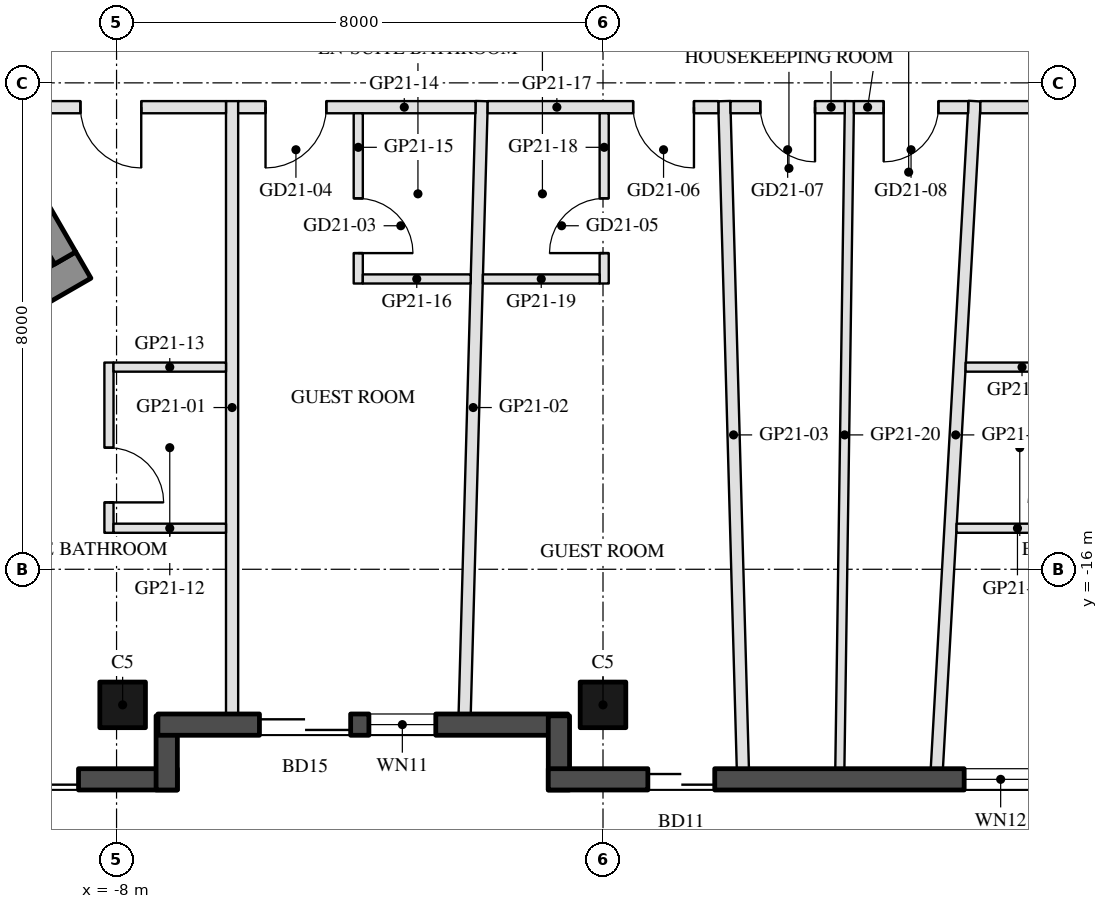
"""IFC4 building model, lengths in metres.
Left out: names, types, materials, properties, quantities, classifications, styles, units other than length and angle.
Written with IfcOpenShell. Run it as: python <this file> out.ifc"""

import sys

from ifc_helpers import new_model, si_unit, direction, frame, frame_2d, origin, origin_2d, place, context, subcontext, project, spatial, rectangle, hollow_rectangle, extrude, element, fill, save


model = new_model("IFC4")
c1 = context("Model", 3, precision=1e-05, world=origin(), true_north=direction((0.0, 1.0)))
c2 = subcontext(c1, "Body", "Model", "MODEL_VIEW")
j1 = project(units=[si_unit("LENGTHUNIT", "METRE"), si_unit("PLANEANGLEUNIT", "RADIAN")], contexts=[c1])
p1 = place(None, origin())
s1 = spatial("IfcSite", under=j1, at=p1, CompositionType="ELEMENT")
p2 = place(p1, origin())
s2 = spatial("IfcBuilding", under=s1, at=p2, CompositionType="ELEMENT")
p3 = place(p2, frame((0.0, 0.0, 220.6)))
s3 = spatial("IfcBuildingStorey", under=s2, at=p3, CompositionType="ELEMENT", Elevation=220.6)
for number, where, z_axis, x_axis in (
    (1, (-7.9, -18.23, 0.0), (0.0, 0.0, 1.0), (-1.0, 0.0, 0.0)),
    (2, (0.0, -18.23, 0.0), (0.0, 0.0, 1.0), (-1.0, 0.0, 0.0)),
):
    element("IfcColumn", number, at=place(p3, frame(where, z_axis=z_axis, x_axis=x_axis)), inside=s3, PredefinedType="COLUMN", context=c2, shape_type="SweptSolid", body=[
        extrude(hollow_rectangle(XDim=0.75, YDim=0.75, WallThickness=0.035, at=origin_2d()), origin(), (0.0, 0.0, 1.0), 3.7),
    ])
p4 = place(p3, frame((-18.816, -19.455, 0.0), z_axis=(0.0, 0.0, 1.0), x_axis=(1.0, 0.0, 0.0)))
e3 = element("IfcWall", 3, at=p4, inside=s3, PredefinedType="SOLIDWALL", context=c2, shape_type="SweptSolid", body=[
    extrude(rectangle(XDim=11.816, YDim=0.35, at=frame_2d((5.908, 0.0))), origin(), (0.0, 0.0, 1.0), 3.55),
])
p5 = place(p4, frame((0.381, 0.0, 0.3)))
e4 = element("IfcOpeningElement", 4, at=p5, cuts=e3, PredefinedType="OPENING", context=c2, shape_type="SweptSolid", body=[
    extrude(rectangle(XDim=1.9, YDim=2.65, at=frame_2d((0.95, 1.325))), frame((0.0, 0.185, 0.0), z_axis=(0.0, -1.0, 0.0), x_axis=(1.0, 0.0, 0.0)), (0.0, 0.0, 1.0), 0.37),
])
p6 = place(p4, frame((7.79, 0.0, 0.0)))
e5 = element("IfcOpeningElement", 5, at=p6, cuts=e3, PredefinedType="OPENING", context=c2, shape_type="SweptSolid", body=[
    extrude(rectangle(XDim=2.4, YDim=2.4, at=frame_2d((1.2, 1.2))), frame((0.0, 0.185, 0.0), z_axis=(0.0, -1.0, 0.0), x_axis=(1.0, 0.0, 0.0)), (0.0, 0.0, 1.0), 0.37),
])
p7 = place(p4, frame((3.741, 0.0, 0.3)))
e6 = element("IfcOpeningElement", 6, at=p7, cuts=e3, PredefinedType="OPENING", context=c2, shape_type="SweptSolid", body=[
    extrude(rectangle(XDim=1.7, YDim=2.65, at=frame_2d((0.85, 1.325))), frame((0.0, 0.185, 0.0), z_axis=(0.0, -1.0, 0.0), x_axis=(1.0, 0.0, 0.0)), (0.0, 0.0, 1.0), 0.37),
])
p8 = place(p4, frame((5.741, 0.0, 0.3)))
e7 = element("IfcOpeningElement", 7, at=p8, cuts=e3, PredefinedType="OPENING", context=c2, shape_type="SweptSolid", body=[
    extrude(rectangle(XDim=1.7, YDim=2.65, at=frame_2d((0.85, 1.325))), frame((0.0, 0.185, 0.0), z_axis=(0.0, -1.0, 0.0), x_axis=(1.0, 0.0, 0.0)), (0.0, 0.0, 1.0), 0.37),
])
p9 = place(p3, frame((-7.175, -19.63, 0.0), z_axis=(0.0, 0.0, 1.0), x_axis=(0.0, 1.0, 0.0)))
e8 = element("IfcWall", 8, at=p9, inside=s3, PredefinedType="SOLIDWALL", context=c2, shape_type="SweptSolid", body=[
    extrude(rectangle(XDim=1.22, YDim=0.35, at=frame_2d((0.61, 0.0))), origin(), (0.0, 0.0, 1.0), 3.55),
])
p10 = place(p3, frame((-7.32, -18.555, 0.0), z_axis=(0.0, 0.0, 1.0), x_axis=(1.0, 0.0, 0.0)))
e9 = element("IfcWall", 9, at=p10, inside=s3, PredefinedType="SOLIDWALL", context=c2, shape_type="SweptSolid", body=[
    extrude(rectangle(XDim=6.74, YDim=0.35, at=frame_2d((3.37, 0.0))), origin(), (0.0, 0.0, 1.0), 3.55),
])
p11 = place(p10, frame((1.67, 0.0, 0.0)))
e10 = element("IfcOpeningElement", 10, at=p11, cuts=e9, PredefinedType="OPENING", context=c2, shape_type="SweptSolid", body=[
    extrude(rectangle(XDim=1.5, YDim=2.4, at=frame_2d((0.75, 1.2))), frame((0.0, 0.185, 0.0), z_axis=(0.0, -1.0, 0.0), x_axis=(1.0, 0.0, 0.0)), (0.0, 0.0, 1.0), 0.37),
])
p12 = place(p10, frame((3.47, 0.0, 0.3)))
e11 = element("IfcOpeningElement", 11, at=p12, cuts=e9, PredefinedType="OPENING", context=c2, shape_type="SweptSolid", body=[
    extrude(rectangle(XDim=1.1, YDim=2.65, at=frame_2d((0.55, 1.325))), frame((0.0, 0.185, 0.0), z_axis=(0.0, -1.0, 0.0), x_axis=(1.0, 0.0, 0.0)), (0.0, 0.0, 1.0), 0.37),
])
p13 = place(p3, frame((-0.725, -18.41, 0.0), z_axis=(0.0, 0.0, 1.0), x_axis=(0.0, -1.0, 0.0)))
e12 = element("IfcWall", 12, at=p13, inside=s3, PredefinedType="SOLIDWALL", context=c2, shape_type="SweptSolid", body=[
    extrude(rectangle(XDim=1.22, YDim=0.35, at=frame_2d((0.61, 0.0))), origin(), (0.0, 0.0, 1.0), 3.55),
])
p14 = place(p3, frame((-0.9, -19.455, 0.0), z_axis=(0.0, 0.0, 1.0), x_axis=(1.0, 0.0, 0.0)))
e13 = element("IfcWall", 13, at=p14, inside=s3, PredefinedType="SOLIDWALL", context=c2, shape_type="SweptSolid", body=[
    extrude(rectangle(XDim=9.7, YDim=0.35, at=frame_2d((4.85, 0.0))), origin(), (0.0, 0.0, 1.0), 3.55),
])
p15 = place(p14, frame((1.638, 0.0, 0.0)))
e14 = element("IfcOpeningElement", 14, at=p15, cuts=e13, PredefinedType="OPENING", context=c2, shape_type="SweptSolid", body=[
    extrude(rectangle(XDim=1.1, YDim=2.4, at=frame_2d((0.55, 1.2))), frame((0.0, 0.185, 0.0), z_axis=(0.0, -1.0, 0.0), x_axis=(1.0, 0.0, 0.0)), (0.0, 0.0, 1.0), 0.37),
])
p16 = place(p14, frame((6.84, 0.0, 0.3)))
e15 = element("IfcOpeningElement", 15, at=p16, cuts=e13, PredefinedType="OPENING", context=c2, shape_type="SweptSolid", body=[
    extrude(rectangle(XDim=1.2, YDim=2.65, at=frame_2d((0.6, 1.325))), frame((0.0, 0.185, 0.0), z_axis=(0.0, -1.0, 0.0), x_axis=(1.0, 0.0, 0.0)), (0.0, 0.0, 1.0), 0.37),
])
p17 = place(p3, frame((-8.547, -10.997, 0.0), z_axis=(0.0, 0.0, 1.0), x_axis=(-0.866025009528, -0.500000682871, 0.0)))
e16 = element("IfcWall", 16, at=p17, inside=s3, PredefinedType="SHEAR", context=c2, shape_type="SweptSolid", body=[
    extrude(rectangle(XDim=14.837, YDim=0.5, at=frame_2d((7.418, 0.0))), origin(), (0.0, 0.0, 1.0), 3.5),
])
p18 = place(p3, frame((-13.845, -2.22, 0.0), z_axis=(0.0, 0.0, 1.0), x_axis=(0.500004234368, -0.866022959057, 0.0)))
e17 = element("IfcWall", 17, at=p18, inside=s3, PredefinedType="SHEAR", context=c2, shape_type="SweptSolid", body=[
    extrude(rectangle(XDim=10.0, YDim=0.4, at=frame_2d((5.0, 0.0))), origin(), (0.0, 0.0, 1.0), 3.5),
])
p19 = place(p18, frame((3.55, 0.0, 0.0)))
e18 = element("IfcOpeningElement", 18, at=p19, cuts=e17, PredefinedType="OPENING", context=c2, shape_type="SweptSolid", body=[
    extrude(rectangle(XDim=1.1, YDim=2.1, at=frame_2d((0.55, 1.05))), frame((0.0, 0.21, 0.0), z_axis=(0.0, -1.0, 0.0), x_axis=(1.0, 0.0, 0.0)), (0.0, 0.0, 1.0), 0.42),
])
p20 = place(p18, frame((5.85, 0.0, 0.0)))
e19 = element("IfcOpeningElement", 19, at=p20, cuts=e17, PredefinedType="OPENING", context=c2, shape_type="SweptSolid", body=[
    extrude(rectangle(XDim=1.4, YDim=2.1, at=frame_2d((0.7, 1.05))), frame((0.0, 0.21, 0.0), z_axis=(0.0, -1.0, 0.0), x_axis=(1.0, 0.0, 0.0)), (0.0, 0.0, 1.0), 0.42),
])
p21 = place(p3, frame((-6.1, -18.38, 0.0), z_axis=(0.0, 0.0, 1.0), x_axis=(0.0, 1.0, 0.0)))
e20 = element("IfcWall", 20, at=p21, inside=s3, PredefinedType="PARTITIONING", context=c2, shape_type="SweptSolid", body=[
    extrude(rectangle(XDim=10.08, YDim=0.2, at=frame_2d((5.04, 0.0))), origin(), (0.0, 0.0, 1.0), 3.06),
])
p22 = place(p3, frame((-2.275, -18.38, 0.0), z_axis=(0.0, 0.0, 1.0), x_axis=(0.027818812611, 0.999612981941, 0.0)))
e21 = element("IfcWall", 21, at=p22, inside=s3, PredefinedType="PARTITIONING", context=c2, shape_type="SweptSolid", body=[
    extrude(rectangle(XDim=10.084, YDim=0.2, at=frame_2d((5.042, 0.0))), origin(), (0.0, 0.0, 1.0), 3.06),
])
p23 = place(p3, frame((2.3, -19.28, 0.0), z_axis=(0.0, 0.0, 1.0), x_axis=(-0.027827525898, 0.999612739416, 0.0)))
e22 = element("IfcWall", 22, at=p23, inside=s3, PredefinedType="PARTITIONING", context=c2, shape_type="SweptSolid", body=[
    extrude(rectangle(XDim=10.984, YDim=0.2, at=frame_2d((5.492, 0.0))), origin(), (0.0, 0.0, 1.0), 3.06),
])
p24 = place(p3, frame((5.49, -19.28, 0.0), z_axis=(0.0, 0.0, 1.0), x_axis=(0.056497863711, 0.998402720046, 0.0)))
e23 = element("IfcWall", 23, at=p24, inside=s3, PredefinedType="PARTITIONING", context=c2, shape_type="SweptSolid", body=[
    extrude(rectangle(XDim=10.998, YDim=0.2, at=frame_2d((5.499, 0.0))), origin(), (0.0, 0.0, 1.0), 3.06),
])
p25 = place(p3, frame((-6.2, -8.4, 0.0), z_axis=(0.0, 0.0, 1.0), x_axis=(-1.0, 0.0, 0.0)))
e24 = element("IfcWall", 24, at=p25, inside=s3, PredefinedType="PARTITIONING", context=c2, shape_type="SweptSolid", body=[
    extrude(rectangle(XDim=3.788, YDim=0.2, at=frame_2d((1.894, 0.0))), origin(), (0.0, 0.0, 1.0), 2.95),
])
p26 = place(p25, frame((1.394, 0.0, 0.0)))
e25 = element("IfcOpeningElement", 25, at=p26, cuts=e24, PredefinedType="OPENING", context=c2, shape_type="SweptSolid", body=[
    extrude(rectangle(XDim=1.0, YDim=2.1, at=frame_2d((0.5, 1.05))), frame((0.0, 0.11, 0.0), z_axis=(0.0, -1.0, 0.0), x_axis=(1.0, 0.0, 0.0)), (0.0, 0.0, 1.0), 0.22),
])
p27 = place(p3, frame((-8.125, -12.6, 0.0), z_axis=(0.0, 0.0, 1.0), x_axis=(0.0, -1.0, 0.0)))
e26 = element("IfcWall", 26, at=p27, inside=s3, PredefinedType="PARTITIONING", context=c2, shape_type="SweptSolid", body=[
    extrude(rectangle(XDim=2.8, YDim=0.15, at=frame_2d((1.4, 0.0))), origin(), (0.0, 0.0, 1.0), 3.55),
])
p28 = place(p27, frame((1.4, 0.0, 0.0)))
e27 = element("IfcOpeningElement", 27, at=p28, cuts=e26, PredefinedType="OPENING", context=c2, shape_type="SweptSolid", body=[
    extrude(rectangle(XDim=0.9, YDim=2.1, at=frame_2d((0.45, 1.05))), frame((0.0, 0.085, 0.0), z_axis=(0.0, -1.0, 0.0), x_axis=(1.0, 0.0, 0.0)), (0.0, 0.0, 1.0), 0.17),
])
for number, where, z_axis, x_axis in (
    (28, (-8.05, -15.325, 0.0), (0.0, 0.0, 1.0), (1.0, 0.0, 0.0)),
    (29, (-8.05, -12.675, 0.0), (0.0, 0.0, 1.0), (1.0, 0.0, 0.0)),
):
    element("IfcWall", number, at=place(p3, frame(where, z_axis=z_axis, x_axis=x_axis)), inside=s3, PredefinedType="PARTITIONING", context=c2, shape_type="SweptSolid", body=[
        extrude(rectangle(XDim=1.85, YDim=0.15, at=frame_2d((0.925, 0.0))), origin(), (0.0, 0.0, 1.0), 2.95),
    ])
p29 = place(p3, frame((-2.097, -8.4, 0.0), z_axis=(0.0, 0.0, 1.0), x_axis=(-1.0, 0.0, 0.0)))
e30 = element("IfcWall", 30, at=p29, inside=s3, PredefinedType="PARTITIONING", context=c2, shape_type="SweptSolid", body=[
    extrude(rectangle(XDim=3.903, YDim=0.2, at=frame_2d((1.951, 0.0))), origin(), (0.0, 0.0, 1.0), 2.95),
])
p30 = place(p29, frame((2.453, 0.0, 0.0)))
e31 = element("IfcOpeningElement", 31, at=p30, cuts=e30, PredefinedType="OPENING", context=c2, shape_type="SweptSolid", body=[
    extrude(rectangle(XDim=1.0, YDim=2.1, at=frame_2d((0.5, 1.05))), frame((0.0, 0.11, 0.0), z_axis=(0.0, -1.0, 0.0), x_axis=(1.0, 0.0, 0.0)), (0.0, 0.0, 1.0), 0.22),
])
p31 = place(p3, frame((-4.025, -8.5, 0.0), z_axis=(0.0, 0.0, 1.0), x_axis=(0.0, -1.0, 0.0)))
e32 = element("IfcWall", 32, at=p31, inside=s3, PredefinedType="PARTITIONING", context=c2, shape_type="SweptSolid", body=[
    extrude(rectangle(XDim=2.8, YDim=0.15, at=frame_2d((1.4, 0.0))), origin(), (0.0, 0.0, 1.0), 2.95),
])
p32 = place(p31, frame((1.4, 0.0, 0.0)))
e33 = element("IfcOpeningElement", 33, at=p32, cuts=e32, PredefinedType="OPENING", context=c2, shape_type="SweptSolid", body=[
    extrude(rectangle(XDim=0.9, YDim=2.1, at=frame_2d((0.45, 1.05))), frame((0.0, 0.085, 0.0), z_axis=(0.0, -1.0, 0.0), x_axis=(1.0, 0.0, 0.0)), (0.0, 0.0, 1.0), 0.17),
])
p33 = place(p3, frame((-3.95, -11.225, 0.0), z_axis=(0.0, 0.0, 1.0), x_axis=(1.0, 0.0, 0.0)))
e34 = element("IfcWall", 34, at=p33, inside=s3, PredefinedType="PARTITIONING", context=c2, shape_type="SweptSolid", body=[
    extrude(rectangle(XDim=1.774, YDim=0.15, at=frame_2d((0.887, 0.0))), origin(), (0.0, 0.0, 1.0), 2.95),
])
p34 = place(p3, frame((1.897, -8.4, 0.0), z_axis=(0.0, 0.0, 1.0), x_axis=(-1.0, 0.0, 0.0)))
e35 = element("IfcWall", 35, at=p34, inside=s3, PredefinedType="PARTITIONING", context=c2, shape_type="SweptSolid", body=[
    extrude(rectangle(XDim=3.794, YDim=0.2, at=frame_2d((1.897, 0.0))), origin(), (0.0, 0.0, 1.0), 2.95),
])
p35 = place(p34, frame((0.401, 0.0, 0.0)))
e36 = element("IfcOpeningElement", 36, at=p35, cuts=e35, PredefinedType="OPENING", context=c2, shape_type="SweptSolid", body=[
    extrude(rectangle(XDim=1.0, YDim=2.1, at=frame_2d((0.5, 1.05))), frame((0.0, 0.11, 0.0), z_axis=(0.0, -1.0, 0.0), x_axis=(1.0, 0.0, 0.0)), (0.0, 0.0, 1.0), 0.22),
])
p36 = place(p3, frame((0.019, -11.3, 0.0), z_axis=(0.0, 0.0, 1.0), x_axis=(0.0, 1.0, 0.0)))
e37 = element("IfcWall", 37, at=p36, inside=s3, PredefinedType="PARTITIONING", context=c2, shape_type="SweptSolid", body=[
    extrude(rectangle(XDim=2.8, YDim=0.15, at=frame_2d((1.4, 0.0))), origin(), (0.0, 0.0, 1.0), 2.95),
])
p37 = place(p36, frame((0.5, 0.0, 0.0)))
e38 = element("IfcOpeningElement", 38, at=p37, cuts=e37, PredefinedType="OPENING", context=c2, shape_type="SweptSolid", body=[
    extrude(rectangle(XDim=0.9, YDim=2.1, at=frame_2d((0.45, 1.05))), frame((0.0, 0.085, 0.0), z_axis=(0.0, -1.0, 0.0), x_axis=(1.0, 0.0, 0.0)), (0.0, 0.0, 1.0), 0.17),
])
p38 = place(p3, frame((-1.976, -11.225, 0.0), z_axis=(0.0, 0.0, 1.0), x_axis=(1.0, 0.0, 0.0)))
e39 = element("IfcWall", 39, at=p38, inside=s3, PredefinedType="PARTITIONING", context=c2, shape_type="SweptSolid", body=[
    extrude(rectangle(XDim=1.92, YDim=0.15, at=frame_2d((0.96, 0.0))), origin(), (0.0, 0.0, 1.0), 2.95),
])
p39 = place(p3, frame((3.895, -19.28, 0.0), z_axis=(0.0, 0.0, 1.0), x_axis=(0.014384601302, 0.99989653627, 0.0)))
e40 = element("IfcWall", 40, at=p39, inside=s3, PredefinedType="PARTITIONING", context=c2, shape_type="SweptSolid", body=[
    extrude(rectangle(XDim=10.981, YDim=0.15, at=frame_2d((5.491, 0.0))), origin(), (0.0, 0.0, 1.0), 2.95),
])
p40 = place(p3, frame((3.976, -8.4, 0.0), z_axis=(0.0, 0.0, 1.0), x_axis=(-1.0, 0.0, 0.0)))
e41 = element("IfcWall", 41, at=p40, inside=s3, PredefinedType="PARTITIONING", context=c2, shape_type="SweptSolid", body=[
    extrude(rectangle(XDim=1.879, YDim=0.2, at=frame_2d((0.939, 0.0))), origin(), (0.0, 0.0, 1.0), 2.95),
])
p41 = place(p40, frame((0.49, 0.0, 0.0)))
e42 = element("IfcOpeningElement", 42, at=p41, cuts=e41, PredefinedType="OPENING", context=c2, shape_type="SweptSolid", body=[
    extrude(rectangle(XDim=0.9, YDim=2.1, at=frame_2d((0.45, 1.05))), frame((0.0, 0.11, 0.0), z_axis=(0.0, -1.0, 0.0), x_axis=(1.0, 0.0, 0.0)), (0.0, 0.0, 1.0), 0.22),
])
p42 = place(p3, frame((6.006, -8.4, 0.0), z_axis=(0.0, 0.0, 1.0), x_axis=(-1.0, 0.0, 0.0)))
e43 = element("IfcWall", 43, at=p42, inside=s3, PredefinedType="PARTITIONING", context=c2, shape_type="SweptSolid", body=[
    extrude(rectangle(XDim=1.879, YDim=0.2, at=frame_2d((0.939, 0.0))), origin(), (0.0, 0.0, 1.0), 3.55),
])
p43 = place(p42, frame((0.49, 0.0, 0.0)))
e44 = element("IfcOpeningElement", 44, at=p43, cuts=e43, PredefinedType="OPENING", context=c2, shape_type="SweptSolid", body=[
    extrude(rectangle(XDim=0.9, YDim=2.1, at=frame_2d((0.45, 1.05))), frame((0.0, 0.11, 0.0), z_axis=(0.0, -1.0, 0.0), x_axis=(1.0, 0.0, 0.0)), (0.0, 0.0, 1.0), 0.22),
])
p44 = place(p3, frame((9.988, -8.4, 0.0), z_axis=(0.0, 0.0, 1.0), x_axis=(-1.0, 0.0, 0.0)))
e45 = element("IfcWall", 45, at=p44, inside=s3, PredefinedType="PARTITIONING", context=c2, shape_type="SweptSolid", body=[
    extrude(rectangle(XDim=3.782, YDim=0.2, at=frame_2d((1.891, 0.0))), origin(), (0.0, 0.0, 1.0), 2.95),
])
p45 = place(p44, frame((1.391, 0.0, 0.0)))
e46 = element("IfcOpeningElement", 46, at=p45, cuts=e45, PredefinedType="OPENING", context=c2, shape_type="SweptSolid", body=[
    extrude(rectangle(XDim=1.0, YDim=2.1, at=frame_2d((0.5, 1.05))), frame((0.0, 0.11, 0.0), z_axis=(0.0, -1.0, 0.0), x_axis=(1.0, 0.0, 0.0)), (0.0, 0.0, 1.0), 0.22),
])
p46 = place(p3, frame((5.814, -15.325, 0.0), z_axis=(0.0, 0.0, 1.0), x_axis=(1.0, 0.0, 0.0)))
e47 = element("IfcWall", 47, at=p46, inside=s3, PredefinedType="PARTITIONING", context=c2, shape_type="SweptSolid", body=[
    extrude(rectangle(XDim=2.004, YDim=0.15, at=frame_2d((1.002, 0.0))), origin(), (0.0, 0.0, 1.0), 2.95),
])
p47 = place(p3, frame((5.964, -12.675, 0.0), z_axis=(0.0, 0.0, 1.0), x_axis=(1.0, 0.0, 0.0)))
e48 = element("IfcWall", 48, at=p47, inside=s3, PredefinedType="PARTITIONING", context=c2, shape_type="SweptSolid", body=[
    extrude(rectangle(XDim=1.854, YDim=0.15, at=frame_2d((0.927, 0.0))), origin(), (0.0, 0.0, 1.0), 2.95),
])
p48 = place(p6, frame((2.4, 0.0, 0.0), z_axis=(0.0, 0.0, 1.0), x_axis=(-1.0, 0.0, 0.0)))
e49 = element("IfcDoor", 49, at=p48, inside=s3, OperationType="SLIDING_TO_LEFT", PredefinedType="DOOR", context=c2, shape_type="SweptSolid", body=[
    extrude(rectangle(XDim=2.4, YDim=2.4, at=frame_2d((1.2, 1.2))), frame((0.0, 0.025, 0.0), z_axis=(0.0, -1.0, 0.0), x_axis=(1.0, 0.0, 0.0)), (0.0, 0.0, 1.0), 0.05),
])
fill(e5, e49)
p49 = place(p11, frame((1.5, 0.0, 0.0), z_axis=(0.0, 0.0, 1.0), x_axis=(-1.0, 0.0, 0.0)))
e50 = element("IfcDoor", 50, at=p49, inside=s3, OperationType="SLIDING_TO_LEFT", PredefinedType="DOOR", context=c2, shape_type="SweptSolid", body=[
    extrude(rectangle(XDim=1.5, YDim=2.4, at=frame_2d((0.75, 1.2))), frame((0.0, 0.025, 0.0), z_axis=(0.0, -1.0, 0.0), x_axis=(1.0, 0.0, 0.0)), (0.0, 0.0, 1.0), 0.05),
])
fill(e10, e50)
p50 = place(p12, origin())
e51 = element("IfcWindow", 51, at=p50, inside=s3, PartitioningType="SINGLE_PANEL", PredefinedType="WINDOW", context=c2, shape_type="SweptSolid", body=[
    extrude(rectangle(XDim=1.1, YDim=2.65, at=frame_2d((0.55, 1.325))), frame((0.0, 0.03, 0.0), z_axis=(0.0, -1.0, 0.0), x_axis=(1.0, 0.0, 0.0)), (0.0, 0.0, 1.0), 0.06),
])
fill(e11, e51)
p51 = place(p15, frame((1.1, 0.0, 0.0), z_axis=(0.0, 0.0, 1.0), x_axis=(-1.0, 0.0, 0.0)))
e52 = element("IfcDoor", 52, at=p51, inside=s3, OperationType="SLIDING_TO_LEFT", PredefinedType="DOOR", context=c2, shape_type="SweptSolid", body=[
    extrude(rectangle(XDim=1.1, YDim=2.4, at=frame_2d((0.55, 1.2))), frame((0.0, 0.025, 0.0), z_axis=(0.0, -1.0, 0.0), x_axis=(1.0, 0.0, 0.0)), (0.0, 0.0, 1.0), 0.05),
])
fill(e14, e52)
p52 = place(p16, origin())
e53 = element("IfcWindow", 53, at=p52, inside=s3, PartitioningType="SINGLE_PANEL", PredefinedType="WINDOW", context=c2, shape_type="SweptSolid", body=[
    extrude(rectangle(XDim=1.2, YDim=2.65, at=frame_2d((0.6, 1.325))), frame((0.0, 0.03, 0.0), z_axis=(0.0, -1.0, 0.0), x_axis=(1.0, 0.0, 0.0)), (0.0, 0.0, 1.0), 0.06),
])
fill(e15, e53)
p53 = place(p28, origin())
e54 = element("IfcDoor", 54, at=p53, inside=s3, OperationType="SINGLE_SWING_RIGHT", PredefinedType="DOOR", context=c2, shape_type="SweptSolid", body=[
    extrude(rectangle(XDim=0.9, YDim=2.1, at=frame_2d((0.45, 1.05))), frame((0.0, 0.025, 0.0), z_axis=(0.0, -1.0, 0.0), x_axis=(1.0, 0.0, 0.0)), (0.0, 0.0, 1.0), 0.05),
])
fill(e27, e54)
p54 = place(p26, origin())
e55 = element("IfcDoor", 55, at=p54, inside=s3, OperationType="SINGLE_SWING_LEFT", PredefinedType="DOOR", context=c2, shape_type="SweptSolid", body=[
    extrude(rectangle(XDim=1.0, YDim=2.1, at=frame_2d((0.5, 1.05))), frame((0.0, 0.025, 0.0), z_axis=(0.0, -1.0, 0.0), x_axis=(1.0, 0.0, 0.0)), (0.0, 0.0, 1.0), 0.05),
])
fill(e25, e55)
p55 = place(p32, origin())
e56 = element("IfcDoor", 56, at=p55, inside=s3, OperationType="SINGLE_SWING_RIGHT", PredefinedType="DOOR", context=c2, shape_type="SweptSolid", body=[
    extrude(rectangle(XDim=0.9, YDim=2.1, at=frame_2d((0.45, 1.05))), frame((0.0, 0.025, 0.0), z_axis=(0.0, -1.0, 0.0), x_axis=(1.0, 0.0, 0.0)), (0.0, 0.0, 1.0), 0.05),
])
fill(e33, e56)
p56 = place(p30, origin())
e57 = element("IfcDoor", 57, at=p56, inside=s3, OperationType="SINGLE_SWING_RIGHT", PredefinedType="DOOR", context=c2, shape_type="SweptSolid", body=[
    extrude(rectangle(XDim=1.0, YDim=2.1, at=frame_2d((0.5, 1.05))), frame((0.0, 0.025, 0.0), z_axis=(0.0, -1.0, 0.0), x_axis=(1.0, 0.0, 0.0)), (0.0, 0.0, 1.0), 0.05),
])
fill(e31, e57)
p57 = place(p37, origin())
e58 = element("IfcDoor", 58, at=p57, inside=s3, OperationType="SINGLE_SWING_LEFT", PredefinedType="DOOR", context=c2, shape_type="SweptSolid", body=[
    extrude(rectangle(XDim=0.9, YDim=2.1, at=frame_2d((0.45, 1.05))), frame((0.0, 0.025, 0.0), z_axis=(0.0, -1.0, 0.0), x_axis=(1.0, 0.0, 0.0)), (0.0, 0.0, 1.0), 0.05),
])
fill(e38, e58)
p58 = place(p35, origin())
e59 = element("IfcDoor", 59, at=p58, inside=s3, OperationType="SINGLE_SWING_LEFT", PredefinedType="DOOR", context=c2, shape_type="SweptSolid", body=[
    extrude(rectangle(XDim=1.0, YDim=2.1, at=frame_2d((0.5, 1.05))), frame((0.0, 0.025, 0.0), z_axis=(0.0, -1.0, 0.0), x_axis=(1.0, 0.0, 0.0)), (0.0, 0.0, 1.0), 0.05),
])
fill(e36, e59)
p59 = place(p41, origin())
e60 = element("IfcDoor", 60, at=p59, inside=s3, OperationType="SINGLE_SWING_LEFT", PredefinedType="DOOR", context=c2, shape_type="SweptSolid", body=[
    extrude(rectangle(XDim=0.9, YDim=2.1, at=frame_2d((0.45, 1.05))), frame((0.0, 0.025, 0.0), z_axis=(0.0, -1.0, 0.0), x_axis=(1.0, 0.0, 0.0)), (0.0, 0.0, 1.0), 0.05),
])
fill(e42, e60)
p60 = place(p43, origin())
e61 = element("IfcDoor", 61, at=p60, inside=s3, OperationType="SINGLE_SWING_RIGHT", PredefinedType="DOOR", context=c2, shape_type="SweptSolid", body=[
    extrude(rectangle(XDim=0.9, YDim=2.1, at=frame_2d((0.45, 1.05))), frame((0.0, 0.025, 0.0), z_axis=(0.0, -1.0, 0.0), x_axis=(1.0, 0.0, 0.0)), (0.0, 0.0, 1.0), 0.05),
])
fill(e44, e61)
save(model, sys.argv[1])
